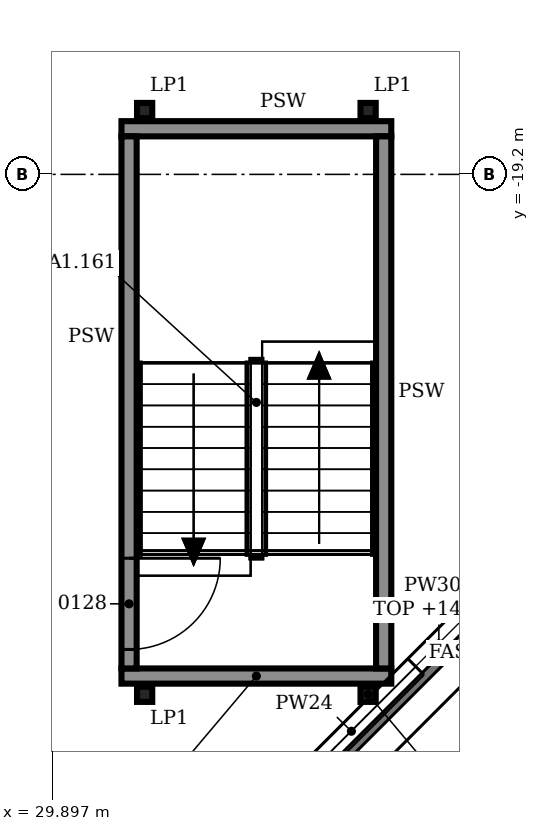
"""IFC4 building model, lengths in metres.
Left out: names, types, materials, properties, quantities, classifications, styles, units other than length and angle.
Written with IfcOpenShell. Run it as: python <this file> out.ifc"""

import sys

from ifc_helpers import new_model, si_unit, direction, frame, frame_2d, origin, origin_2d, place, context, subcontext, project, spatial, rectangle, i_section, extrude, element, fill, save


model = new_model("IFC4")
c1 = context("Model", 3, precision=1e-05, world=origin(), true_north=direction((0.0, 1.0)))
c2 = subcontext(c1, "Body", "Model", "MODEL_VIEW")
j1 = project(units=[si_unit("LENGTHUNIT", "METRE"), si_unit("PLANEANGLEUNIT", "RADIAN")], contexts=[c1])
p1 = place(None, origin())
s1 = spatial("IfcSite", under=j1, at=p1, CompositionType="ELEMENT")
p2 = place(p1, origin())
s2 = spatial("IfcBuilding", under=s1, at=p2, CompositionType="ELEMENT")
p3 = place(p2, frame((0.0, 0.0, 9.0)))
s3 = spatial("IfcBuildingStorey", under=s2, at=p3, CompositionType="ELEMENT", Elevation=9.0)
for number, where, z_axis, x_axis in (
    (1, (31.105, -18.36, 0.0), (0.0, 0.0, 1.0), (1.0, 0.0, 0.0)),
    (2, (34.045, -18.36, 0.0), (0.0, 0.0, 1.0), (1.0, 0.0, 0.0)),
    (3, (31.105, -26.04, 0.0), (0.0, 0.0, 1.0), (1.0, 0.0, 0.0)),
    (4, (34.045, -26.04, 0.0), (0.0, 0.0, 1.0), (1.0, 0.0, 0.0)),
):
    element("IfcColumn", number, at=place(p3, frame(where, z_axis=z_axis, x_axis=x_axis)), inside=s3, PredefinedType="COLUMN", context=c2, shape_type="SweptSolid", body=[
        extrude(i_section(OverallWidth=0.2, OverallDepth=0.2, WebThickness=0.009, FlangeThickness=0.015, FilletRadius=0.018, at=origin_2d()), origin(), (0.0, 0.0, 1.0), 6.0),
    ])
p4 = place(p3, frame((32.675, -27.677, 0.0), z_axis=(0.0, 0.0, 1.0), x_axis=(0.707088024292, 0.707125537583, 0.0)))
e5 = element("IfcWall", 5, at=p4, inside=s3, PredefinedType="SOLIDWALL", context=c2, shape_type="SweptSolid", body=[
    extrude(rectangle(XDim=6.508, YDim=0.3, at=frame_2d((3.254, 0.0))), origin(), (0.0, 0.0, 1.0), 5.2),
])
p5 = place(p4, frame((0.427, 0.0, 0.9)))
e6 = element("IfcOpeningElement", 6, at=p5, cuts=e5, PredefinedType="OPENING", context=c2, shape_type="SweptSolid", body=[
    extrude(rectangle(XDim=2.4, YDim=2.4, at=frame_2d((1.2, 1.2))), frame((0.0, 0.16, 0.0), z_axis=(0.0, -1.0, 0.0), x_axis=(1.0, 0.0, 0.0)), (0.0, 0.0, 1.0), 0.32),
])
p6 = place(p4, frame((3.681, 0.0, 0.9)))
e7 = element("IfcOpeningElement", 7, at=p6, cuts=e5, PredefinedType="OPENING", context=c2, shape_type="SweptSolid", body=[
    extrude(rectangle(XDim=2.4, YDim=2.4, at=frame_2d((1.2, 1.2))), frame((0.0, 0.16, 0.0), z_axis=(0.0, -1.0, 0.0), x_axis=(1.0, 0.0, 0.0)), (0.0, 0.0, 1.0), 0.32),
])
p7 = place(p3, frame((30.8, -25.8, 0.0), z_axis=(0.0, 0.0, 1.0), x_axis=(1.0, 0.0, 0.0)))
e8 = element("IfcWall", 8, at=p7, inside=s3, PredefinedType="SOLIDWALL", context=c2, shape_type="SweptSolid", body=[
    extrude(rectangle(XDim=3.55, YDim=0.2, at=frame_2d((1.775, 0.0))), origin(), (0.0, 0.0, 1.0), 5.8),
])
p8 = place(p3, frame((30.9, -25.7, 0.0), z_axis=(0.0, 0.0, 1.0), x_axis=(0.0, 1.0, 0.0)))
e9 = element("IfcWall", 9, at=p8, inside=s3, PredefinedType="SOLIDWALL", context=c2, shape_type="SweptSolid", body=[
    extrude(rectangle(XDim=7.0, YDim=0.2, at=frame_2d((3.5, 0.0))), origin(), (0.0, 0.0, 1.0), 5.8),
])
p9 = place(p8, frame((0.25, 0.0, 0.0)))
e10 = element("IfcOpeningElement", 10, at=p9, cuts=e9, PredefinedType="OPENING", context=c2, shape_type="SweptSolid", body=[
    extrude(rectangle(XDim=1.2, YDim=2.1, at=frame_2d((0.6, 1.05))), frame((0.0, 0.11, 0.0), z_axis=(0.0, -1.0, 0.0), x_axis=(1.0, 0.0, 0.0)), (0.0, 0.0, 1.0), 0.22),
])
p10 = place(p3, frame((34.25, -25.7, 0.0), z_axis=(0.0, 0.0, 1.0), x_axis=(0.0, 1.0, 0.0)))
e11 = element("IfcWall", 11, at=p10, inside=s3, PredefinedType="SOLIDWALL", context=c2, shape_type="SweptSolid", body=[
    extrude(rectangle(XDim=7.0, YDim=0.2, at=frame_2d((3.5, 0.0))), origin(), (0.0, 0.0, 1.0), 5.8),
])
p11 = place(p3, frame((30.8, -18.6, 0.0), z_axis=(0.0, 0.0, 1.0), x_axis=(1.0, 0.0, 0.0)))
e12 = element("IfcWall", 12, at=p11, inside=s3, PredefinedType="SOLIDWALL", context=c2, shape_type="SweptSolid", body=[
    extrude(rectangle(XDim=3.55, YDim=0.2, at=frame_2d((1.775, 0.0))), origin(), (0.0, 0.0, 1.0), 5.8),
])
p12 = place(p5, origin())
e13 = element("IfcWindow", 13, at=p12, inside=s3, PartitioningType="SINGLE_PANEL", PredefinedType="WINDOW", context=c2, shape_type="SweptSolid", body=[
    extrude(rectangle(XDim=2.4, YDim=2.4, at=frame_2d((1.2, 1.2))), frame((0.0, 0.03, 0.0), z_axis=(0.0, -1.0, 0.0), x_axis=(1.0, 0.0, 0.0)), (0.0, 0.0, 1.0), 0.06),
])
fill(e6, e13)
p13 = place(p9, frame((1.2, 0.0, 0.0), z_axis=(0.0, 0.0, 1.0), x_axis=(-1.0, 0.0, 0.0)))
e14 = element("IfcDoor", 14, at=p13, inside=s3, OperationType="SINGLE_SWING_LEFT", PredefinedType="DOOR", context=c2, shape_type="SweptSolid", body=[
    extrude(rectangle(XDim=1.2, YDim=2.1, at=frame_2d((0.6, 1.05))), frame((0.0, 0.025, 0.0), z_axis=(0.0, -1.0, 0.0), x_axis=(1.0, 0.0, 0.0)), (0.0, 0.0, 1.0), 0.05),
])
fill(e10, e14)
save(model, sys.argv[1])
